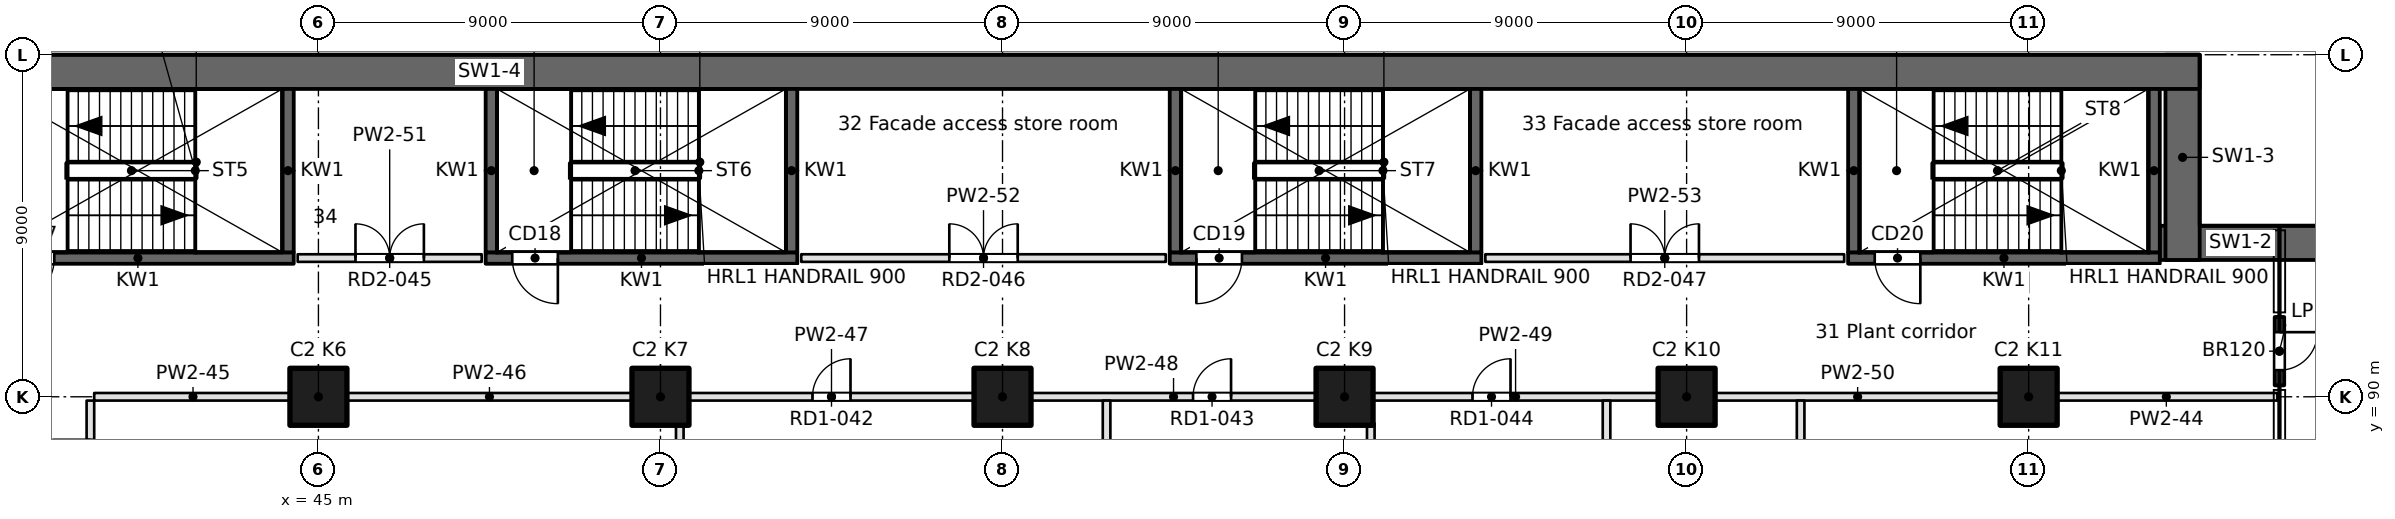
"""IFC4 building model, lengths in metres.
Left out: names, types, materials, properties, quantities, classifications, styles, units other than length and angle.
Written with IfcOpenShell. Run it as: python <this file> out.ifc"""

import sys

from ifc_helpers import new_model, si_unit, direction, frame, frame_2d, origin, origin_2d, place, context, subcontext, project, spatial, rectangle, extrude, element, fill, save


model = new_model("IFC4")
c1 = context("Model", 3, precision=1e-05, world=origin(), true_north=direction((0.0, 1.0)))
c2 = subcontext(c1, "Body", "Model", "MODEL_VIEW")
j1 = project(units=[si_unit("LENGTHUNIT", "METRE"), si_unit("PLANEANGLEUNIT", "RADIAN")], contexts=[c1])
p1 = place(None, origin())
s1 = spatial("IfcSite", under=j1, at=p1, CompositionType="ELEMENT")
p2 = place(p1, origin())
s2 = spatial("IfcBuilding", under=s1, at=p2, CompositionType="ELEMENT")
p3 = place(p2, frame((0.0, 0.0, 31.2)))
s3 = spatial("IfcBuildingStorey", under=s2, at=p3, CompositionType="ELEMENT", Elevation=31.2)
for number, where, z_axis, x_axis in (
    (1, (45.0, 90.0, 0.0), (0.0, 0.0, 1.0), (1.0, 0.0, 0.0)),
    (2, (54.0, 90.0, 0.0), (0.0, 0.0, 1.0), (1.0, 0.0, 0.0)),
    (3, (63.0, 90.0, 0.0), (0.0, 0.0, 1.0), (1.0, 0.0, 0.0)),
    (4, (72.0, 90.0, 0.0), (0.0, 0.0, 1.0), (1.0, 0.0, 0.0)),
    (5, (81.0, 90.0, 0.0), (0.0, 0.0, 1.0), (1.0, 0.0, 0.0)),
    (6, (90.0, 90.0, 0.0), (0.0, 0.0, 1.0), (1.0, 0.0, 0.0)),
):
    element("IfcColumn", number, at=place(p3, frame(where, z_axis=z_axis, x_axis=x_axis)), inside=s3, PredefinedType="COLUMN", context=c2, shape_type="SweptSolid", body=[
        extrude(rectangle(XDim=1.5, YDim=1.5, at=origin_2d()), origin(), (0.0, 0.0, 1.0), 4.6),
    ])
p4 = place(p3, frame((97.7, 94.05, 0.0), z_axis=(0.0, 0.0, 1.0), x_axis=(-1.0, 0.0, 0.0)))
e7 = element("IfcWall", 7, at=p4, inside=s3, PredefinedType="SHEAR", context=c2, shape_type="SweptSolid", body=[
    extrude(rectangle(XDim=4.25, YDim=0.9, at=frame_2d((2.125, 0.0))), origin(), (0.0, 0.0, 1.0), 4.6),
])
p5 = place(p3, frame((94.05, 93.6, 0.0), z_axis=(0.0, 0.0, 1.0), x_axis=(0.0, 1.0, 0.0)))
e8 = element("IfcWall", 8, at=p5, inside=s3, PredefinedType="SHEAR", context=c2, shape_type="SweptSolid", body=[
    extrude(rectangle(XDim=5.4, YDim=0.9, at=frame_2d((2.7, 0.0))), origin(), (0.0, 0.0, 1.0), 4.6),
])
p6 = place(p3, frame((94.5, 98.55, 0.0), z_axis=(0.0, 0.0, 1.0), x_axis=(-1.0, 0.0, 0.0)))
e9 = element("IfcWall", 9, at=p6, inside=s3, PredefinedType="SHEAR", context=c2, shape_type="SweptSolid", body=[
    extrude(rectangle(XDim=90.0, YDim=0.9, at=frame_2d((45.0, 0.0))), origin(), (0.0, 0.0, 1.0), 4.6),
])
p7 = place(p3, frame((96.599, 90.3, 0.0), z_axis=(0.0, 0.0, 1.0), x_axis=(0.0, 1.0, 0.0)))
e10 = element("IfcWall", 10, at=p7, inside=s3, PredefinedType="SOLIDWALL", context=c2, shape_type="SweptSolid", body=[
    extrude(rectangle(XDim=1.8, YDim=0.25, at=frame_2d((0.9, 0.0))), origin(), (0.0, 0.0, 1.0), 4.2),
])
p8 = place(p7, frame((0.4, 0.0, 0.0)))
e11 = element("IfcOpeningElement", 11, at=p8, cuts=e10, PredefinedType="OPENING", context=c2, shape_type="SweptSolid", body=[
    extrude(rectangle(XDim=1.0, YDim=2.1, at=frame_2d((0.5, 1.05))), frame((0.0, 0.125, 0.0), z_axis=(0.0, -1.0, 0.0), x_axis=(1.0, 0.0, 0.0)), (0.0, 0.0, 1.0), 0.25),
])
p9 = place(p3, frame((36.15, 93.65, -0.45), z_axis=(0.0, 0.0, 1.0), x_axis=(1.0, 0.0, 0.0)))
e12 = element("IfcWall", 12, at=p9, inside=s3, PredefinedType="SOLIDWALL", context=c2, shape_type="SweptSolid", body=[
    extrude(rectangle(XDim=8.2, YDim=0.3, at=frame_2d((4.1, 0.0))), origin(), (0.0, 0.0, 1.0), 4.65),
])
p10 = place(p9, frame((0.7, 0.0, 0.45)))
e13 = element("IfcOpeningElement", 13, at=p10, cuts=e12, PredefinedType="OPENING", context=c2, shape_type="SweptSolid", body=[
    extrude(rectangle(XDim=1.2, YDim=2.1, at=frame_2d((0.6, 1.05))), frame((0.0, 0.15, 0.0), z_axis=(0.0, -1.0, 0.0), x_axis=(1.0, 0.0, 0.0)), (0.0, 0.0, 1.0), 0.3),
])
p11 = place(p3, frame((49.4, 93.65, -0.45), z_axis=(0.0, 0.0, 1.0), x_axis=(1.0, 0.0, 0.0)))
e14 = element("IfcWall", 14, at=p11, inside=s3, PredefinedType="SOLIDWALL", context=c2, shape_type="SweptSolid", body=[
    extrude(rectangle(XDim=8.2, YDim=0.3, at=frame_2d((4.1, 0.0))), origin(), (0.0, 0.0, 1.0), 4.65),
])
p12 = place(p11, frame((0.7, 0.0, 0.45)))
e15 = element("IfcOpeningElement", 15, at=p12, cuts=e14, PredefinedType="OPENING", context=c2, shape_type="SweptSolid", body=[
    extrude(rectangle(XDim=1.2, YDim=2.1, at=frame_2d((0.6, 1.05))), frame((0.0, 0.15, 0.0), z_axis=(0.0, -1.0, 0.0), x_axis=(1.0, 0.0, 0.0)), (0.0, 0.0, 1.0), 0.3),
])
p13 = place(p3, frame((67.4, 93.65, -0.45), z_axis=(0.0, 0.0, 1.0), x_axis=(1.0, 0.0, 0.0)))
e16 = element("IfcWall", 16, at=p13, inside=s3, PredefinedType="SOLIDWALL", context=c2, shape_type="SweptSolid", body=[
    extrude(rectangle(XDim=8.2, YDim=0.3, at=frame_2d((4.1, 0.0))), origin(), (0.0, 0.0, 1.0), 4.65),
])
p14 = place(p13, frame((0.7, 0.0, 0.45)))
e17 = element("IfcOpeningElement", 17, at=p14, cuts=e16, PredefinedType="OPENING", context=c2, shape_type="SweptSolid", body=[
    extrude(rectangle(XDim=1.2, YDim=2.1, at=frame_2d((0.6, 1.05))), frame((0.0, 0.15, 0.0), z_axis=(0.0, -1.0, 0.0), x_axis=(1.0, 0.0, 0.0)), (0.0, 0.0, 1.0), 0.3),
])
p15 = place(p3, frame((85.25, 93.65, -0.45), z_axis=(0.0, 0.0, 1.0), x_axis=(1.0, 0.0, 0.0)))
e18 = element("IfcWall", 18, at=p15, inside=s3, PredefinedType="SOLIDWALL", context=c2, shape_type="SweptSolid", body=[
    extrude(rectangle(XDim=8.2, YDim=0.3, at=frame_2d((4.1, 0.0))), origin(), (0.0, 0.0, 1.0), 4.65),
])
p16 = place(p15, frame((0.7, 0.0, 0.45)))
e19 = element("IfcOpeningElement", 19, at=p16, cuts=e18, PredefinedType="OPENING", context=c2, shape_type="SweptSolid", body=[
    extrude(rectangle(XDim=1.2, YDim=2.1, at=frame_2d((0.6, 1.05))), frame((0.0, 0.15, 0.0), z_axis=(0.0, -1.0, 0.0), x_axis=(1.0, 0.0, 0.0)), (0.0, 0.0, 1.0), 0.3),
])
for number, where, z_axis, x_axis in (
    (20, (44.2, 93.8, -0.45), (0.0, 0.0, 1.0), (0.0, 1.0, 0.0)),
    (21, (49.55, 93.8, -0.45), (0.0, 0.0, 1.0), (0.0, 1.0, 0.0)),
    (22, (57.45, 93.8, -0.45), (0.0, 0.0, 1.0), (0.0, 1.0, 0.0)),
    (23, (67.55, 93.8, -0.45), (0.0, 0.0, 1.0), (0.0, 1.0, 0.0)),
    (24, (75.45, 93.8, -0.45), (0.0, 0.0, 1.0), (0.0, 1.0, 0.0)),
    (25, (85.4, 93.8, -0.45), (0.0, 0.0, 1.0), (0.0, 1.0, 0.0)),
    (26, (93.3, 93.8, -0.45), (0.0, 0.0, 1.0), (0.0, 1.0, 0.0)),
):
    element("IfcWall", number, at=place(p3, frame(where, z_axis=z_axis, x_axis=x_axis)), inside=s3, PredefinedType="SOLIDWALL", context=c2, shape_type="SweptSolid", body=[
        extrude(rectangle(XDim=4.3, YDim=0.3, at=frame_2d((2.15, 0.0))), origin(), (0.0, 0.0, 1.0), 4.65),
    ])
p17 = place(p3, frame((96.545, 90.0, 0.0), z_axis=(0.0, 0.0, 1.0), x_axis=(-1.0, 0.0, 0.0)))
e27 = element("IfcWall", 27, at=p17, inside=s3, PredefinedType="PARTITIONING", context=c2, shape_type="SweptSolid", body=[
    extrude(rectangle(XDim=5.845, YDim=0.2, at=frame_2d((2.922, 0.0))), origin(), (0.0, 0.0, 1.0), 4.2),
])
p18 = place(p3, frame((44.3, 90.0, 0.0), z_axis=(0.0, 0.0, 1.0), x_axis=(-1.0, 0.0, 0.0)))
e28 = element("IfcWall", 28, at=p18, inside=s3, PredefinedType="PARTITIONING", context=c2, shape_type="SweptSolid", body=[
    extrude(rectangle(XDim=5.2, YDim=0.2, at=frame_2d((2.6, 0.0))), origin(), (0.0, 0.0, 1.0), 4.2),
])
p19 = place(p3, frame((53.3, 90.0, 0.0), z_axis=(0.0, 0.0, 1.0), x_axis=(-1.0, 0.0, 0.0)))
e29 = element("IfcWall", 29, at=p19, inside=s3, PredefinedType="PARTITIONING", context=c2, shape_type="SweptSolid", body=[
    extrude(rectangle(XDim=7.6, YDim=0.2, at=frame_2d((3.8, 0.0))), origin(), (0.0, 0.0, 1.0), 4.2),
])
p20 = place(p3, frame((62.3, 90.0, 0.0), z_axis=(0.0, 0.0, 1.0), x_axis=(-1.0, 0.0, 0.0)))
e30 = element("IfcWall", 30, at=p20, inside=s3, PredefinedType="PARTITIONING", context=c2, shape_type="SweptSolid", body=[
    extrude(rectangle(XDim=7.6, YDim=0.2, at=frame_2d((3.8, 0.0))), origin(), (0.0, 0.0, 1.0), 4.2),
])
p21 = place(p20, frame((3.3, 0.0, 0.0)))
e31 = element("IfcOpeningElement", 31, at=p21, cuts=e30, PredefinedType="OPENING", context=c2, shape_type="SweptSolid", body=[
    extrude(rectangle(XDim=1.0, YDim=2.1, at=frame_2d((0.5, 1.05))), frame((0.0, 0.1, 0.0), z_axis=(0.0, -1.0, 0.0), x_axis=(1.0, 0.0, 0.0)), (0.0, 0.0, 1.0), 0.2),
])
p22 = place(p3, frame((71.3, 90.0, 0.0), z_axis=(0.0, 0.0, 1.0), x_axis=(-1.0, 0.0, 0.0)))
e32 = element("IfcWall", 32, at=p22, inside=s3, PredefinedType="PARTITIONING", context=c2, shape_type="SweptSolid", body=[
    extrude(rectangle(XDim=7.6, YDim=0.2, at=frame_2d((3.8, 0.0))), origin(), (0.0, 0.0, 1.0), 4.2),
])
p23 = place(p22, frame((2.287, 0.0, 0.0)))
e33 = element("IfcOpeningElement", 33, at=p23, cuts=e32, PredefinedType="OPENING", context=c2, shape_type="SweptSolid", body=[
    extrude(rectangle(XDim=1.0, YDim=2.1, at=frame_2d((0.5, 1.05))), frame((0.0, 0.1, 0.0), z_axis=(0.0, -1.0, 0.0), x_axis=(1.0, 0.0, 0.0)), (0.0, 0.0, 1.0), 0.2),
])
p24 = place(p3, frame((80.3, 90.0, 0.0), z_axis=(0.0, 0.0, 1.0), x_axis=(-1.0, 0.0, 0.0)))
e34 = element("IfcWall", 34, at=p24, inside=s3, PredefinedType="PARTITIONING", context=c2, shape_type="SweptSolid", body=[
    extrude(rectangle(XDim=7.6, YDim=0.2, at=frame_2d((3.8, 0.0))), origin(), (0.0, 0.0, 1.0), 4.2),
])
p25 = place(p24, frame((3.933, 0.0, 0.0)))
e35 = element("IfcOpeningElement", 35, at=p25, cuts=e34, PredefinedType="OPENING", context=c2, shape_type="SweptSolid", body=[
    extrude(rectangle(XDim=1.0, YDim=2.1, at=frame_2d((0.5, 1.05))), frame((0.0, 0.1, 0.0), z_axis=(0.0, -1.0, 0.0), x_axis=(1.0, 0.0, 0.0)), (0.0, 0.0, 1.0), 0.2),
])
p26 = place(p3, frame((89.3, 90.0, 0.0), z_axis=(0.0, 0.0, 1.0), x_axis=(-1.0, 0.0, 0.0)))
e36 = element("IfcWall", 36, at=p26, inside=s3, PredefinedType="PARTITIONING", context=c2, shape_type="SweptSolid", body=[
    extrude(rectangle(XDim=7.6, YDim=0.2, at=frame_2d((3.8, 0.0))), origin(), (0.0, 0.0, 1.0), 4.2),
])
p27 = place(p3, frame((44.454, 93.65, 0.0), z_axis=(0.0, 0.0, 1.0), x_axis=(1.0, 0.0, 0.0)))
e37 = element("IfcWall", 37, at=p27, inside=s3, PredefinedType="PARTITIONING", context=c2, shape_type="SweptSolid", body=[
    extrude(rectangle(XDim=4.842, YDim=0.2, at=frame_2d((2.421, 0.0))), origin(), (0.0, 0.0, 1.0), 4.2),
])
p28 = place(p27, frame((1.521, 0.0, 0.0)))
e38 = element("IfcOpeningElement", 38, at=p28, cuts=e37, PredefinedType="OPENING", context=c2, shape_type="SweptSolid", body=[
    extrude(rectangle(XDim=1.8, YDim=2.1, at=frame_2d((0.9, 1.05))), frame((0.0, 0.1, 0.0), z_axis=(0.0, -1.0, 0.0), x_axis=(1.0, 0.0, 0.0)), (0.0, 0.0, 1.0), 0.2),
])
p29 = place(p3, frame((57.704, 93.65, 0.0), z_axis=(0.0, 0.0, 1.0), x_axis=(1.0, 0.0, 0.0)))
e39 = element("IfcWall", 39, at=p29, inside=s3, PredefinedType="PARTITIONING", context=c2, shape_type="SweptSolid", body=[
    extrude(rectangle(XDim=9.592, YDim=0.2, at=frame_2d((4.796, 0.0))), origin(), (0.0, 0.0, 1.0), 4.2),
])
p30 = place(p29, frame((3.896, 0.0, 0.0)))
e40 = element("IfcOpeningElement", 40, at=p30, cuts=e39, PredefinedType="OPENING", context=c2, shape_type="SweptSolid", body=[
    extrude(rectangle(XDim=1.8, YDim=2.1, at=frame_2d((0.9, 1.05))), frame((0.0, 0.1, 0.0), z_axis=(0.0, -1.0, 0.0), x_axis=(1.0, 0.0, 0.0)), (0.0, 0.0, 1.0), 0.2),
])
p31 = place(p3, frame((75.704, 93.65, 0.0), z_axis=(0.0, 0.0, 1.0), x_axis=(1.0, 0.0, 0.0)))
e41 = element("IfcWall", 41, at=p31, inside=s3, PredefinedType="PARTITIONING", context=c2, shape_type="SweptSolid", body=[
    extrude(rectangle(XDim=9.442, YDim=0.2, at=frame_2d((4.721, 0.0))), origin(), (0.0, 0.0, 1.0), 4.2),
])
p32 = place(p31, frame((3.821, 0.0, 0.0)))
e42 = element("IfcOpeningElement", 42, at=p32, cuts=e41, PredefinedType="OPENING", context=c2, shape_type="SweptSolid", body=[
    extrude(rectangle(XDim=1.8, YDim=2.1, at=frame_2d((0.9, 1.05))), frame((0.0, 0.1, 0.0), z_axis=(0.0, -1.0, 0.0), x_axis=(1.0, 0.0, 0.0)), (0.0, 0.0, 1.0), 0.2),
])
p33 = place(p3, frame((39.0, 89.9, 0.0), z_axis=(0.0, 0.0, 1.0), x_axis=(0.0, -1.0, 0.0)))
e43 = element("IfcWall", 43, at=p33, inside=s3, PredefinedType="PARTITIONING", context=c2, shape_type="SweptSolid", body=[
    extrude(rectangle(XDim=21.917, YDim=0.2, at=frame_2d((10.958, 0.0))), origin(), (0.0, 0.0, 1.0), 4.2),
])
p34 = place(p33, frame((15.371, 0.0, 0.0)))
e44 = element("IfcOpeningElement", 44, at=p34, cuts=e43, PredefinedType="OPENING", context=c2, shape_type="SweptSolid", body=[
    extrude(rectangle(XDim=1.0, YDim=2.1, at=frame_2d((0.5, 1.05))), frame((0.0, 0.1, 0.0), z_axis=(0.0, -1.0, 0.0), x_axis=(1.0, 0.0, 0.0)), (0.0, 0.0, 1.0), 0.2),
])
p35 = place(p33, frame((12.871, 0.0, 0.0)))
e45 = element("IfcOpeningElement", 45, at=p35, cuts=e43, PredefinedType="OPENING", context=c2, shape_type="SweptSolid", body=[
    extrude(rectangle(XDim=1.0, YDim=2.1, at=frame_2d((0.5, 1.05))), frame((0.0, 0.1, 0.0), z_axis=(0.0, -1.0, 0.0), x_axis=(1.0, 0.0, 0.0)), (0.0, 0.0, 1.0), 0.2),
])
p36 = place(p33, frame((3.531, 0.0, 0.0)))
e46 = element("IfcOpeningElement", 46, at=p36, cuts=e43, PredefinedType="OPENING", context=c2, shape_type="SweptSolid", body=[
    extrude(rectangle(XDim=1.0, YDim=2.1, at=frame_2d((0.5, 1.05))), frame((0.0, 0.1, 0.0), z_axis=(0.0, -1.0, 0.0), x_axis=(1.0, 0.0, 0.0)), (0.0, 0.0, 1.0), 0.2),
])
p37 = place(p33, frame((1.031, 0.0, 0.0)))
e47 = element("IfcOpeningElement", 47, at=p37, cuts=e43, PredefinedType="OPENING", context=c2, shape_type="SweptSolid", body=[
    extrude(rectangle(XDim=1.0, YDim=2.1, at=frame_2d((0.5, 1.05))), frame((0.0, 0.1, 0.0), z_axis=(0.0, -1.0, 0.0), x_axis=(1.0, 0.0, 0.0)), (0.0, 0.0, 1.0), 0.2),
])
p38 = place(p3, frame((54.508, 89.3, 0.0), z_axis=(0.0, 0.0, 1.0), x_axis=(0.0, -1.0, 0.0)))
e48 = element("IfcWall", 48, at=p38, inside=s3, PredefinedType="PARTITIONING", context=c2, shape_type="SweptSolid", body=[
    extrude(rectangle(XDim=7.3, YDim=0.2, at=frame_2d((3.65, 0.0))), origin(), (0.0, 0.0, 1.0), 4.2),
])
p39 = place(p3, frame((65.738, 89.9, 0.0), z_axis=(0.0, 0.0, 1.0), x_axis=(0.0, -1.0, 0.0)))
e49 = element("IfcWall", 49, at=p39, inside=s3, PredefinedType="PARTITIONING", context=c2, shape_type="SweptSolid", body=[
    extrude(rectangle(XDim=7.9, YDim=0.2, at=frame_2d((3.95, 0.0))), origin(), (0.0, 0.0, 1.0), 4.2),
])
p40 = place(p3, frame((72.69, 89.3, 0.0), z_axis=(0.0, 0.0, 1.0), x_axis=(0.0, -1.0, 0.0)))
e50 = element("IfcWall", 50, at=p40, inside=s3, PredefinedType="PARTITIONING", context=c2, shape_type="SweptSolid", body=[
    extrude(rectangle(XDim=7.3, YDim=0.2, at=frame_2d((3.65, 0.0))), origin(), (0.0, 0.0, 1.0), 4.2),
])
for number, where, z_axis, x_axis in (
    (51, (78.893, 89.9, 0.0), (0.0, 0.0, 1.0), (0.0, -1.0, 0.0)),
    (52, (84.0, 89.9, 0.0), (0.0, 0.0, 1.0), (0.0, -1.0, 0.0)),
):
    element("IfcWall", number, at=place(p3, frame(where, z_axis=z_axis, x_axis=x_axis)), inside=s3, PredefinedType="PARTITIONING", context=c2, shape_type="SweptSolid", body=[
        extrude(rectangle(XDim=7.9, YDim=0.2, at=frame_2d((3.95, 0.0))), origin(), (0.0, 0.0, 1.0), 4.2),
    ])
p41 = place(p8, frame((1.0, 0.0, 0.0), z_axis=(0.0, 0.0, 1.0), x_axis=(-1.0, 0.0, 0.0)))
e53 = element("IfcDoor", 53, at=p41, inside=s3, OperationType="SINGLE_SWING_LEFT", PredefinedType="DOOR", context=c2, shape_type="SweptSolid", body=[
    extrude(rectangle(XDim=1.0, YDim=2.1, at=frame_2d((0.5, 1.05))), frame((0.0, 0.025, 0.0), z_axis=(0.0, -1.0, 0.0), x_axis=(1.0, 0.0, 0.0)), (0.0, 0.0, 1.0), 0.05),
])
fill(e11, e53)
p42 = place(p10, frame((1.2, 0.0, 0.0), z_axis=(0.0, 0.0, 1.0), x_axis=(-1.0, 0.0, 0.0)))
e54 = element("IfcDoor", 54, at=p42, inside=s3, OperationType="SINGLE_SWING_RIGHT", PredefinedType="DOOR", context=c2, shape_type="SweptSolid", body=[
    extrude(rectangle(XDim=1.2, YDim=2.1, at=frame_2d((0.6, 1.05))), frame((0.0, 0.025, 0.0), z_axis=(0.0, -1.0, 0.0), x_axis=(1.0, 0.0, 0.0)), (0.0, 0.0, 1.0), 0.05),
])
fill(e13, e54)
p43 = place(p12, frame((1.2, 0.0, 0.0), z_axis=(0.0, 0.0, 1.0), x_axis=(-1.0, 0.0, 0.0)))
e55 = element("IfcDoor", 55, at=p43, inside=s3, OperationType="SINGLE_SWING_LEFT", PredefinedType="DOOR", context=c2, shape_type="SweptSolid", body=[
    extrude(rectangle(XDim=1.2, YDim=2.1, at=frame_2d((0.6, 1.05))), frame((0.0, 0.025, 0.0), z_axis=(0.0, -1.0, 0.0), x_axis=(1.0, 0.0, 0.0)), (0.0, 0.0, 1.0), 0.05),
])
fill(e15, e55)
p44 = place(p14, frame((1.2, 0.0, 0.0), z_axis=(0.0, 0.0, 1.0), x_axis=(-1.0, 0.0, 0.0)))
e56 = element("IfcDoor", 56, at=p44, inside=s3, OperationType="SINGLE_SWING_RIGHT", PredefinedType="DOOR", context=c2, shape_type="SweptSolid", body=[
    extrude(rectangle(XDim=1.2, YDim=2.1, at=frame_2d((0.6, 1.05))), frame((0.0, 0.025, 0.0), z_axis=(0.0, -1.0, 0.0), x_axis=(1.0, 0.0, 0.0)), (0.0, 0.0, 1.0), 0.05),
])
fill(e17, e56)
p45 = place(p16, frame((1.2, 0.0, 0.0), z_axis=(0.0, 0.0, 1.0), x_axis=(-1.0, 0.0, 0.0)))
e57 = element("IfcDoor", 57, at=p45, inside=s3, OperationType="SINGLE_SWING_LEFT", PredefinedType="DOOR", context=c2, shape_type="SweptSolid", body=[
    extrude(rectangle(XDim=1.2, YDim=2.1, at=frame_2d((0.6, 1.05))), frame((0.0, 0.025, 0.0), z_axis=(0.0, -1.0, 0.0), x_axis=(1.0, 0.0, 0.0)), (0.0, 0.0, 1.0), 0.05),
])
fill(e19, e57)
p46 = place(p21, frame((1.0, 0.0, 0.0), z_axis=(0.0, 0.0, 1.0), x_axis=(-1.0, 0.0, 0.0)))
e58 = element("IfcDoor", 58, at=p46, inside=s3, OperationType="SINGLE_SWING_RIGHT", PredefinedType="DOOR", context=c2, shape_type="SweptSolid", body=[
    extrude(rectangle(XDim=1.0, YDim=2.1, at=frame_2d((0.5, 1.05))), frame((0.0, 0.025, 0.0), z_axis=(0.0, -1.0, 0.0), x_axis=(1.0, 0.0, 0.0)), (0.0, 0.0, 1.0), 0.05),
])
fill(e31, e58)
p47 = place(p23, frame((1.0, 0.0, 0.0), z_axis=(0.0, 0.0, 1.0), x_axis=(-1.0, 0.0, 0.0)))
e59 = element("IfcDoor", 59, at=p47, inside=s3, OperationType="SINGLE_SWING_RIGHT", PredefinedType="DOOR", context=c2, shape_type="SweptSolid", body=[
    extrude(rectangle(XDim=1.0, YDim=2.1, at=frame_2d((0.5, 1.05))), frame((0.0, 0.025, 0.0), z_axis=(0.0, -1.0, 0.0), x_axis=(1.0, 0.0, 0.0)), (0.0, 0.0, 1.0), 0.05),
])
fill(e33, e59)
p48 = place(p25, frame((1.0, 0.0, 0.0), z_axis=(0.0, 0.0, 1.0), x_axis=(-1.0, 0.0, 0.0)))
e60 = element("IfcDoor", 60, at=p48, inside=s3, OperationType="SINGLE_SWING_RIGHT", PredefinedType="DOOR", context=c2, shape_type="SweptSolid", body=[
    extrude(rectangle(XDim=1.0, YDim=2.1, at=frame_2d((0.5, 1.05))), frame((0.0, 0.025, 0.0), z_axis=(0.0, -1.0, 0.0), x_axis=(1.0, 0.0, 0.0)), (0.0, 0.0, 1.0), 0.05),
])
fill(e35, e60)
p49 = place(p28, origin())
e61 = element("IfcDoor", 61, at=p49, inside=s3, OperationType="DOUBLE_DOOR_SINGLE_SWING", PredefinedType="DOOR", context=c2, shape_type="SweptSolid", body=[
    extrude(rectangle(XDim=1.8, YDim=2.1, at=frame_2d((0.9, 1.05))), frame((0.0, 0.025, 0.0), z_axis=(0.0, -1.0, 0.0), x_axis=(1.0, 0.0, 0.0)), (0.0, 0.0, 1.0), 0.05),
])
fill(e38, e61)
p50 = place(p30, origin())
e62 = element("IfcDoor", 62, at=p50, inside=s3, OperationType="DOUBLE_DOOR_SINGLE_SWING", PredefinedType="DOOR", context=c2, shape_type="SweptSolid", body=[
    extrude(rectangle(XDim=1.8, YDim=2.1, at=frame_2d((0.9, 1.05))), frame((0.0, 0.025, 0.0), z_axis=(0.0, -1.0, 0.0), x_axis=(1.0, 0.0, 0.0)), (0.0, 0.0, 1.0), 0.05),
])
fill(e40, e62)
p51 = place(p32, origin())
e63 = element("IfcDoor", 63, at=p51, inside=s3, OperationType="DOUBLE_DOOR_SINGLE_SWING", PredefinedType="DOOR", context=c2, shape_type="SweptSolid", body=[
    extrude(rectangle(XDim=1.8, YDim=2.1, at=frame_2d((0.9, 1.05))), frame((0.0, 0.025, 0.0), z_axis=(0.0, -1.0, 0.0), x_axis=(1.0, 0.0, 0.0)), (0.0, 0.0, 1.0), 0.05),
])
fill(e42, e63)
save(model, sys.argv[1])
